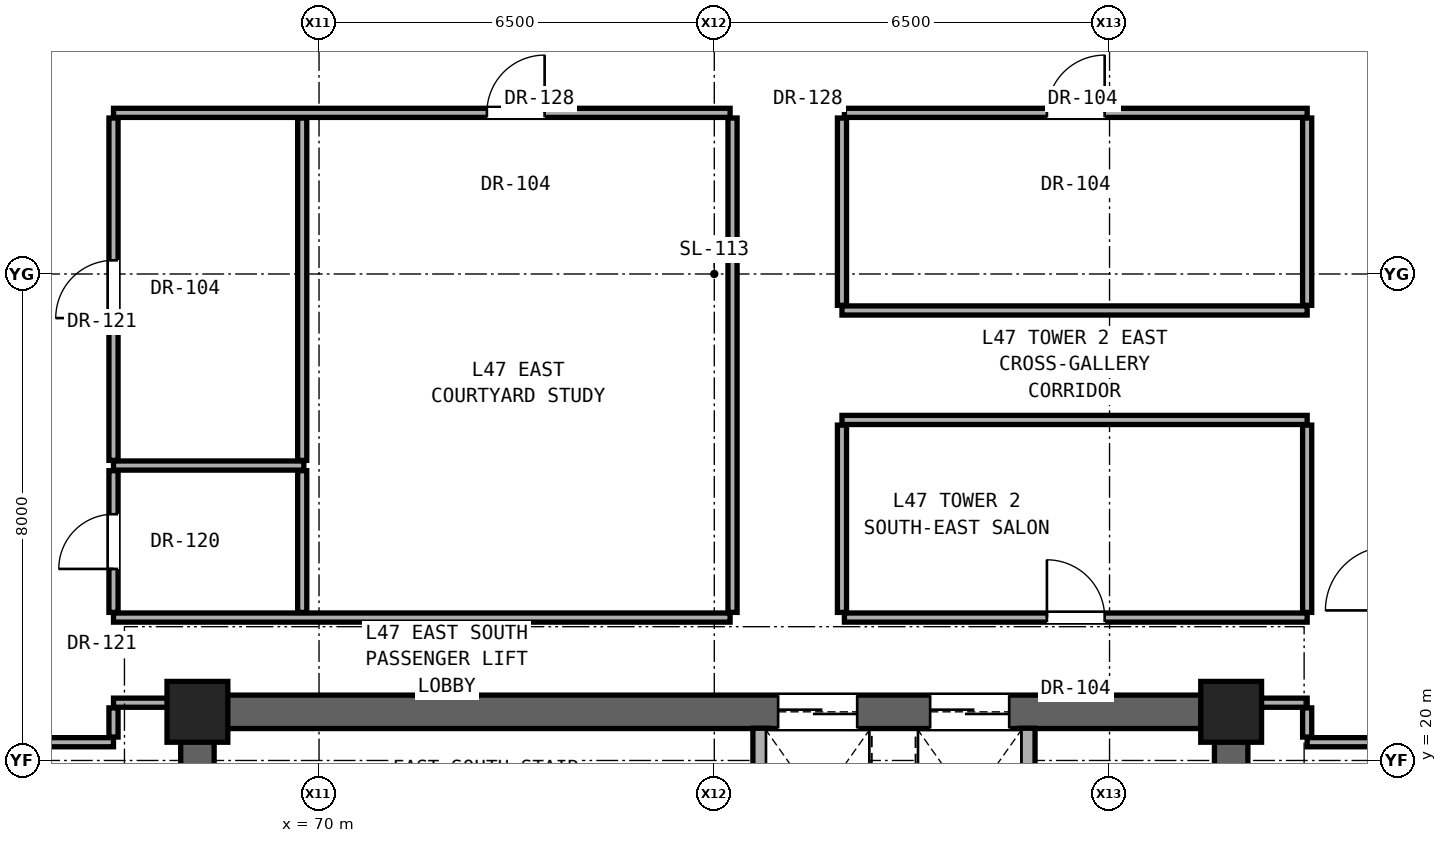
"""IFC4 building model, lengths in metres.
Left out: names, types, materials, properties, quantities, classifications, styles, units other than length and angle.
Written with IfcOpenShell. Run it as: python <this file> out.ifc"""

import sys

from ifc_helpers import new_model, si_unit, direction, frame, frame_2d, origin, origin_2d, place, context, subcontext, project, spatial, rectangle, extrude, element, fill, save


model = new_model("IFC4")
c1 = context("Model", 3, precision=1e-05, world=origin(), true_north=direction((0.0, 1.0)))
c2 = subcontext(c1, "Body", "Model", "MODEL_VIEW")
j1 = project(units=[si_unit("LENGTHUNIT", "METRE"), si_unit("PLANEANGLEUNIT", "RADIAN")], contexts=[c1])
p1 = place(None, origin())
s1 = spatial("IfcSite", under=j1, at=p1, CompositionType="ELEMENT")
p2 = place(p1, origin())
s2 = spatial("IfcBuilding", under=s1, at=p2, CompositionType="ELEMENT")
p3 = place(p2, frame((0.0, 0.0, 167.4)))
s3 = spatial("IfcBuildingStorey", under=s2, at=p3, CompositionType="ELEMENT", Elevation=167.4)
for number, where, z_axis, x_axis in (
    (1, (68.0, 20.8, 0.0), (0.0, 0.0, 1.0), (1.0, 0.0, 0.0)),
    (2, (85.0, 20.8, 0.0), (0.0, 0.0, 1.0), (1.0, 0.0, 0.0)),
):
    element("IfcColumn", number, at=place(p3, frame(where, z_axis=z_axis, x_axis=x_axis)), inside=s3, PredefinedType="COLUMN", context=c2, shape_type="SweptSolid", body=[
        extrude(rectangle(XDim=1.0, YDim=1.0, at=origin_2d()), origin(), (0.0, 0.0, 1.0), 3.25),
    ])
for number, where, z_axis, x_axis in (
    (3, (68.0, 15.2, 0.0), (0.0, 0.0, 1.0), (0.0, 1.0, 0.0)),
    (4, (85.0, 15.2, 0.0), (0.0, 0.0, 1.0), (0.0, 1.0, 0.0)),
):
    element("IfcWall", number, at=place(p3, frame(where, z_axis=z_axis, x_axis=x_axis)), inside=s3, PredefinedType="SHEAR", context=c2, shape_type="SweptSolid", body=[
        extrude(rectangle(XDim=5.6, YDim=0.55, at=frame_2d((2.8, 0.0))), origin(), (0.0, 0.0, 1.0), 3.05),
    ])
p4 = place(p3, frame((68.0, 20.8, 0.0), z_axis=(0.0, 0.0, 1.0), x_axis=(1.0, 0.0, 0.0)))
e5 = element("IfcWall", 5, at=p4, inside=s3, PredefinedType="SHEAR", context=c2, shape_type="SweptSolid", body=[
    extrude(rectangle(XDim=17.0, YDim=0.55, at=frame_2d((8.5, 0.0))), origin(), (0.0, 0.0, 1.0), 3.05),
])
p5 = place(p4, frame((9.55, 0.0, 0.0)))
e6 = element("IfcOpeningElement", 6, at=p5, cuts=e5, PredefinedType="OPENING", context=c2, shape_type="SweptSolid", body=[
    extrude(rectangle(XDim=1.3, YDim=2.3, at=frame_2d((0.65, 1.15))), frame((0.0, 0.285, 0.0), z_axis=(0.0, -1.0, 0.0), x_axis=(1.0, 0.0, 0.0)), (0.0, 0.0, 1.0), 0.57),
])
p6 = place(p4, frame((12.05, 0.0, 0.0)))
e7 = element("IfcOpeningElement", 7, at=p6, cuts=e5, PredefinedType="OPENING", context=c2, shape_type="SweptSolid", body=[
    extrude(rectangle(XDim=1.3, YDim=2.3, at=frame_2d((0.65, 1.15))), frame((0.0, 0.285, 0.0), z_axis=(0.0, -1.0, 0.0), x_axis=(1.0, 0.0, 0.0)), (0.0, 0.0, 1.0), 0.57),
])
p7 = place(p3, frame((65.25, 20.3, 0.0), z_axis=(0.0, 0.0, 1.0), x_axis=(1.0, 0.0, 0.0)))
e8 = element("IfcWall", 8, at=p7, inside=s3, PredefinedType="PARTITIONING", context=c2, shape_type="SweptSolid", body=[
    extrude(rectangle(XDim=1.37, YDim=0.15, at=frame_2d((0.685, 0.0))), origin(), (0.0, 0.0, 1.0), 3.05),
])
p8 = place(p3, frame((86.25, 20.3, 0.0), z_axis=(0.0, 0.0, 1.0), x_axis=(1.0, 0.0, 0.0)))
e9 = element("IfcWall", 9, at=p8, inside=s3, PredefinedType="PARTITIONING", context=c2, shape_type="SweptSolid", body=[
    extrude(rectangle(XDim=1.35, YDim=0.15, at=frame_2d((0.675, 0.0))), origin(), (0.0, 0.0, 1.0), 3.05),
])
p9 = place(p3, frame((66.62, 20.95, 0.0), z_axis=(0.0, 0.0, 1.0), x_axis=(1.0, 0.0, 0.0)))
e10 = element("IfcWall", 10, at=p9, inside=s3, PredefinedType="PARTITIONING", context=c2, shape_type="SweptSolid", body=[
    extrude(rectangle(XDim=1.11, YDim=0.15, at=frame_2d((0.555, 0.0))), origin(), (0.0, 0.0, 1.0), 2.442),
])
p10 = place(p3, frame((85.27, 20.95, 0.0), z_axis=(0.0, 0.0, 1.0), x_axis=(1.0, 0.0, 0.0)))
e11 = element("IfcWall", 11, at=p10, inside=s3, PredefinedType="PARTITIONING", context=c2, shape_type="SweptSolid", body=[
    extrude(rectangle(XDim=0.98, YDim=0.15, at=frame_2d((0.49, 0.0))), origin(), (0.0, 0.0, 1.0), 2.442),
])
p11 = place(p3, frame((66.62, 22.35, 0.0), z_axis=(0.0, 0.0, 1.0), x_axis=(1.0, 0.0, 0.0)))
e12 = element("IfcWall", 12, at=p11, inside=s3, PredefinedType="PARTITIONING", context=c2, shape_type="SweptSolid", body=[
    extrude(rectangle(XDim=10.14, YDim=0.15, at=frame_2d((5.07, 0.0))), origin(), (0.0, 0.0, 1.0), 2.186),
])
p12 = place(p3, frame((78.64, 22.35, 0.0), z_axis=(0.0, 0.0, 1.0), x_axis=(1.0, 0.0, 0.0)))
e13 = element("IfcWall", 13, at=p12, inside=s3, PredefinedType="PARTITIONING", context=c2, shape_type="SweptSolid", body=[
    extrude(rectangle(XDim=7.61, YDim=0.15, at=frame_2d((3.805, 0.0))), origin(), (0.0, 0.0, 1.0), 2.186),
])
p13 = place(p12, frame((3.33, 0.0, 0.0)))
e14 = element("IfcOpeningElement", 14, at=p13, cuts=e13, PredefinedType="OPENING", context=c2, shape_type="SweptSolid", body=[
    extrude(rectangle(XDim=0.95, YDim=2.15, at=frame_2d((0.475, 1.075))), frame((0.0, 0.085, 0.0), z_axis=(0.0, -1.0, 0.0), x_axis=(1.0, 0.0, 0.0)), (0.0, 0.0, 1.0), 0.17),
])
p14 = place(p3, frame((66.62, 24.85, 0.0), z_axis=(0.0, 0.0, 1.0), x_axis=(1.0, 0.0, 0.0)))
e15 = element("IfcWall", 15, at=p14, inside=s3, PredefinedType="PARTITIONING", context=c2, shape_type="SweptSolid", body=[
    extrude(rectangle(XDim=3.13, YDim=0.15, at=frame_2d((1.565, 0.0))), origin(), (0.0, 0.0, 1.0), 2.186),
])
for number, where, z_axis, x_axis in (
    (16, (78.6, 25.6, 0.0), (0.0, 0.0, 1.0), (1.0, 0.0, 0.0)),
    (17, (78.6, 27.4, 0.0), (0.0, 0.0, 1.0), (1.0, 0.0, 0.0)),
):
    element("IfcWall", number, at=place(p3, frame(where, z_axis=z_axis, x_axis=x_axis)), inside=s3, PredefinedType="PARTITIONING", context=c2, shape_type="SweptSolid", body=[
        extrude(rectangle(XDim=7.65, YDim=0.15, at=frame_2d((3.825, 0.0))), origin(), (0.0, 0.0, 1.0), 2.186),
    ])
p15 = place(p3, frame((66.62, 30.65, 0.0), z_axis=(0.0, 0.0, 1.0), x_axis=(1.0, 0.0, 0.0)))
e18 = element("IfcWall", 18, at=p15, inside=s3, PredefinedType="PARTITIONING", context=c2, shape_type="SweptSolid", body=[
    extrude(rectangle(XDim=10.14, YDim=0.15, at=frame_2d((5.07, 0.0))), origin(), (0.0, 0.0, 1.0), 2.186),
])
p16 = place(p15, frame((6.14, 0.0, 0.0)))
e19 = element("IfcOpeningElement", 19, at=p16, cuts=e18, PredefinedType="OPENING", context=c2, shape_type="SweptSolid", body=[
    extrude(rectangle(XDim=0.95, YDim=2.15, at=frame_2d((0.475, 1.075))), frame((0.0, 0.085, 0.0), z_axis=(0.0, -1.0, 0.0), x_axis=(1.0, 0.0, 0.0)), (0.0, 0.0, 1.0), 0.17),
])
p17 = place(p3, frame((78.64, 30.65, 0.0), z_axis=(0.0, 0.0, 1.0), x_axis=(1.0, 0.0, 0.0)))
e20 = element("IfcWall", 20, at=p17, inside=s3, PredefinedType="PARTITIONING", context=c2, shape_type="SweptSolid", body=[
    extrude(rectangle(XDim=7.61, YDim=0.15, at=frame_2d((3.805, 0.0))), origin(), (0.0, 0.0, 1.0), 2.186),
])
p18 = place(p17, frame((3.33, 0.0, 0.0)))
e21 = element("IfcOpeningElement", 21, at=p18, cuts=e20, PredefinedType="OPENING", context=c2, shape_type="SweptSolid", body=[
    extrude(rectangle(XDim=0.95, YDim=2.15, at=frame_2d((0.475, 1.075))), frame((0.0, 0.085, 0.0), z_axis=(0.0, -1.0, 0.0), x_axis=(1.0, 0.0, 0.0)), (0.0, 0.0, 1.0), 0.17),
])
p19 = place(p3, frame((66.62, 20.385, 0.0), z_axis=(0.0, 0.0, 1.0), x_axis=(0.0, 1.0, 0.0)))
e22 = element("IfcWall", 22, at=p19, inside=s3, PredefinedType="PARTITIONING", context=c2, shape_type="SweptSolid", body=[
    extrude(rectangle(XDim=0.48, YDim=0.15, at=frame_2d((0.24, 0.0))), origin(), (0.0, 0.0, 1.0), 2.442),
])
p20 = place(p3, frame((66.62, 22.435, 0.0), z_axis=(0.0, 0.0, 1.0), x_axis=(0.0, 1.0, 0.0)))
e23 = element("IfcWall", 23, at=p20, inside=s3, PredefinedType="PARTITIONING", context=c2, shape_type="SweptSolid", body=[
    extrude(rectangle(XDim=2.33, YDim=0.15, at=frame_2d((1.165, 0.0))), origin(), (0.0, 0.0, 1.0), 3.05),
])
p21 = place(p20, frame((0.715, 0.0, 0.0)))
e24 = element("IfcOpeningElement", 24, at=p21, cuts=e23, PredefinedType="OPENING", context=c2, shape_type="SweptSolid", body=[
    extrude(rectangle(XDim=0.9, YDim=2.1, at=frame_2d((0.45, 1.05))), frame((0.0, 0.085, 0.0), z_axis=(0.0, -1.0, 0.0), x_axis=(1.0, 0.0, 0.0)), (0.0, 0.0, 1.0), 0.17),
])
p22 = place(p3, frame((66.62, 24.935, 0.0), z_axis=(0.0, 0.0, 1.0), x_axis=(0.0, 1.0, 0.0)))
e25 = element("IfcWall", 25, at=p22, inside=s3, PredefinedType="PARTITIONING", context=c2, shape_type="SweptSolid", body=[
    extrude(rectangle(XDim=5.63, YDim=0.15, at=frame_2d((2.815, 0.0))), origin(), (0.0, 0.0, 1.0), 2.346),
])
p23 = place(p22, frame((2.34, 0.0, 0.0)))
e26 = element("IfcOpeningElement", 26, at=p23, cuts=e25, PredefinedType="OPENING", context=c2, shape_type="SweptSolid", body=[
    extrude(rectangle(XDim=0.95, YDim=2.15, at=frame_2d((0.475, 1.075))), frame((0.0, 0.085, 0.0), z_axis=(0.0, -1.0, 0.0), x_axis=(1.0, 0.0, 0.0)), (0.0, 0.0, 1.0), 0.17),
])
p24 = place(p3, frame((69.723, 22.435, 0.0), z_axis=(0.0, 0.0, 1.0), x_axis=(0.0, 1.0, 0.0)))
e27 = element("IfcWall", 27, at=p24, inside=s3, PredefinedType="PARTITIONING", context=c2, shape_type="SweptSolid", body=[
    extrude(rectangle(XDim=2.33, YDim=0.15, at=frame_2d((1.165, 0.0))), origin(), (0.0, 0.0, 1.0), 3.05),
])
p25 = place(p3, frame((69.723, 24.935, 0.0), z_axis=(0.0, 0.0, 1.0), x_axis=(0.0, 1.0, 0.0)))
e28 = element("IfcWall", 28, at=p25, inside=s3, PredefinedType="PARTITIONING", context=c2, shape_type="SweptSolid", body=[
    extrude(rectangle(XDim=5.63, YDim=0.15, at=frame_2d((2.815, 0.0))), origin(), (0.0, 0.0, 1.0), 2.186),
])
p26 = place(p3, frame((76.8, 22.435, 0.0), z_axis=(0.0, 0.0, 1.0), x_axis=(0.0, 1.0, 0.0)))
e29 = element("IfcWall", 29, at=p26, inside=s3, PredefinedType="PARTITIONING", context=c2, shape_type="SweptSolid", body=[
    extrude(rectangle(XDim=8.13, YDim=0.15, at=frame_2d((4.065, 0.0))), origin(), (0.0, 0.0, 1.0), 2.186),
])
p27 = place(p3, frame((77.26, 18.735, 0.0), z_axis=(0.0, 0.0, 1.0), x_axis=(0.0, 1.0, 0.0)))
e30 = element("IfcWall", 30, at=p27, inside=s3, PredefinedType="SOLIDWALL", context=c2, shape_type="SweptSolid", body=[
    extrude(rectangle(XDim=1.795, YDim=0.25, at=frame_2d((0.897, 0.0))), origin(), (0.0, 0.0, 1.0), 3.05),
])
p28 = place(p3, frame((78.6, 22.435, 0.0), z_axis=(0.0, 0.0, 1.0), x_axis=(0.0, 1.0, 0.0)))
e31 = element("IfcWall", 31, at=p28, inside=s3, PredefinedType="PARTITIONING", context=c2, shape_type="SweptSolid", body=[
    extrude(rectangle(XDim=3.08, YDim=0.15, at=frame_2d((1.54, 0.0))), origin(), (0.0, 0.0, 1.0), 3.05),
])
p29 = place(p3, frame((78.6, 27.485, 0.0), z_axis=(0.0, 0.0, 1.0), x_axis=(0.0, 1.0, 0.0)))
e32 = element("IfcWall", 32, at=p29, inside=s3, PredefinedType="PARTITIONING", context=c2, shape_type="SweptSolid", body=[
    extrude(rectangle(XDim=3.08, YDim=0.15, at=frame_2d((1.54, 0.0))), origin(), (0.0, 0.0, 1.0), 2.186),
])
p30 = place(p3, frame((81.65, 18.185, 0.0), z_axis=(0.0, 0.0, 1.0), x_axis=(0.0, 1.0, 0.0)))
e33 = element("IfcWall", 33, at=p30, inside=s3, PredefinedType="SOLIDWALL", context=c2, shape_type="SweptSolid", body=[
    extrude(rectangle(XDim=2.345, YDim=0.25, at=frame_2d((1.172, 0.0))), origin(), (0.0, 0.0, 1.0), 3.05),
])
p31 = place(p3, frame((86.25, 20.385, 0.0), z_axis=(0.0, 0.0, 1.0), x_axis=(0.0, 1.0, 0.0)))
e34 = element("IfcWall", 34, at=p31, inside=s3, PredefinedType="PARTITIONING", context=c2, shape_type="SweptSolid", body=[
    extrude(rectangle(XDim=0.48, YDim=0.15, at=frame_2d((0.24, 0.0))), origin(), (0.0, 0.0, 1.0), 2.442),
])
p32 = place(p3, frame((86.25, 22.435, 0.0), z_axis=(0.0, 0.0, 1.0), x_axis=(0.0, 1.0, 0.0)))
e35 = element("IfcWall", 35, at=p32, inside=s3, PredefinedType="PARTITIONING", context=c2, shape_type="SweptSolid", body=[
    extrude(rectangle(XDim=3.08, YDim=0.15, at=frame_2d((1.54, 0.0))), origin(), (0.0, 0.0, 1.0), 3.05),
])
p33 = place(p3, frame((86.25, 27.485, 0.0), z_axis=(0.0, 0.0, 1.0), x_axis=(0.0, 1.0, 0.0)))
e36 = element("IfcWall", 36, at=p33, inside=s3, PredefinedType="PARTITIONING", context=c2, shape_type="SweptSolid", body=[
    extrude(rectangle(XDim=3.08, YDim=0.15, at=frame_2d((1.54, 0.0))), origin(), (0.0, 0.0, 1.0), 2.346),
])
p34 = place(p21, origin())
e37 = element("IfcDoor", 37, at=p34, inside=s3, OperationType="SINGLE_SWING_LEFT", PredefinedType="DOOR", context=c2, shape_type="SweptSolid", body=[
    extrude(rectangle(XDim=0.9, YDim=2.1, at=frame_2d((0.45, 1.05))), frame((0.0, 0.025, 0.0), z_axis=(0.0, -1.0, 0.0), x_axis=(1.0, 0.0, 0.0)), (0.0, 0.0, 1.0), 0.05),
])
fill(e24, e37)
p35 = place(p23, origin())
e38 = element("IfcDoor", 38, at=p35, inside=s3, OperationType="SINGLE_SWING_LEFT", PredefinedType="DOOR", context=c2, shape_type="SweptSolid", body=[
    extrude(rectangle(XDim=0.95, YDim=2.15, at=frame_2d((0.475, 1.075))), frame((0.0, 0.025, 0.0), z_axis=(0.0, -1.0, 0.0), x_axis=(1.0, 0.0, 0.0)), (0.0, 0.0, 1.0), 0.05),
])
fill(e26, e38)
p36 = place(p16, origin())
e39 = element("IfcDoor", 39, at=p36, inside=s3, OperationType="SINGLE_SWING_RIGHT", PredefinedType="DOOR", context=c2, shape_type="SweptSolid", body=[
    extrude(rectangle(XDim=0.95, YDim=2.15, at=frame_2d((0.475, 1.075))), frame((0.0, 0.025, 0.0), z_axis=(0.0, -1.0, 0.0), x_axis=(1.0, 0.0, 0.0)), (0.0, 0.0, 1.0), 0.05),
])
fill(e19, e39)
p37 = place(p13, origin())
e40 = element("IfcDoor", 40, at=p37, inside=s3, OperationType="SINGLE_SWING_LEFT", PredefinedType="DOOR", context=c2, shape_type="SweptSolid", body=[
    extrude(rectangle(XDim=0.95, YDim=2.15, at=frame_2d((0.475, 1.075))), frame((0.0, 0.025, 0.0), z_axis=(0.0, -1.0, 0.0), x_axis=(1.0, 0.0, 0.0)), (0.0, 0.0, 1.0), 0.05),
])
fill(e14, e40)
p38 = place(p18, origin())
e41 = element("IfcDoor", 41, at=p38, inside=s3, OperationType="SINGLE_SWING_RIGHT", PredefinedType="DOOR", context=c2, shape_type="SweptSolid", body=[
    extrude(rectangle(XDim=0.95, YDim=2.15, at=frame_2d((0.475, 1.075))), frame((0.0, 0.025, 0.0), z_axis=(0.0, -1.0, 0.0), x_axis=(1.0, 0.0, 0.0)), (0.0, 0.0, 1.0), 0.05),
])
fill(e21, e41)
p39 = place(p5, origin())
e42 = element("IfcDoor", 42, at=p39, inside=s3, OperationType="DOUBLE_DOOR_SLIDING", PredefinedType="DOOR", context=c2, shape_type="SweptSolid", body=[
    extrude(rectangle(XDim=1.3, YDim=2.3, at=frame_2d((0.65, 1.15))), frame((0.0, 0.025, 0.0), z_axis=(0.0, -1.0, 0.0), x_axis=(1.0, 0.0, 0.0)), (0.0, 0.0, 1.0), 0.05),
])
fill(e6, e42)
p40 = place(p6, origin())
e43 = element("IfcDoor", 43, at=p40, inside=s3, OperationType="DOUBLE_DOOR_SLIDING", PredefinedType="DOOR", context=c2, shape_type="SweptSolid", body=[
    extrude(rectangle(XDim=1.3, YDim=2.3, at=frame_2d((0.65, 1.15))), frame((0.0, 0.025, 0.0), z_axis=(0.0, -1.0, 0.0), x_axis=(1.0, 0.0, 0.0)), (0.0, 0.0, 1.0), 0.05),
])
fill(e7, e43)
save(model, sys.argv[1])
